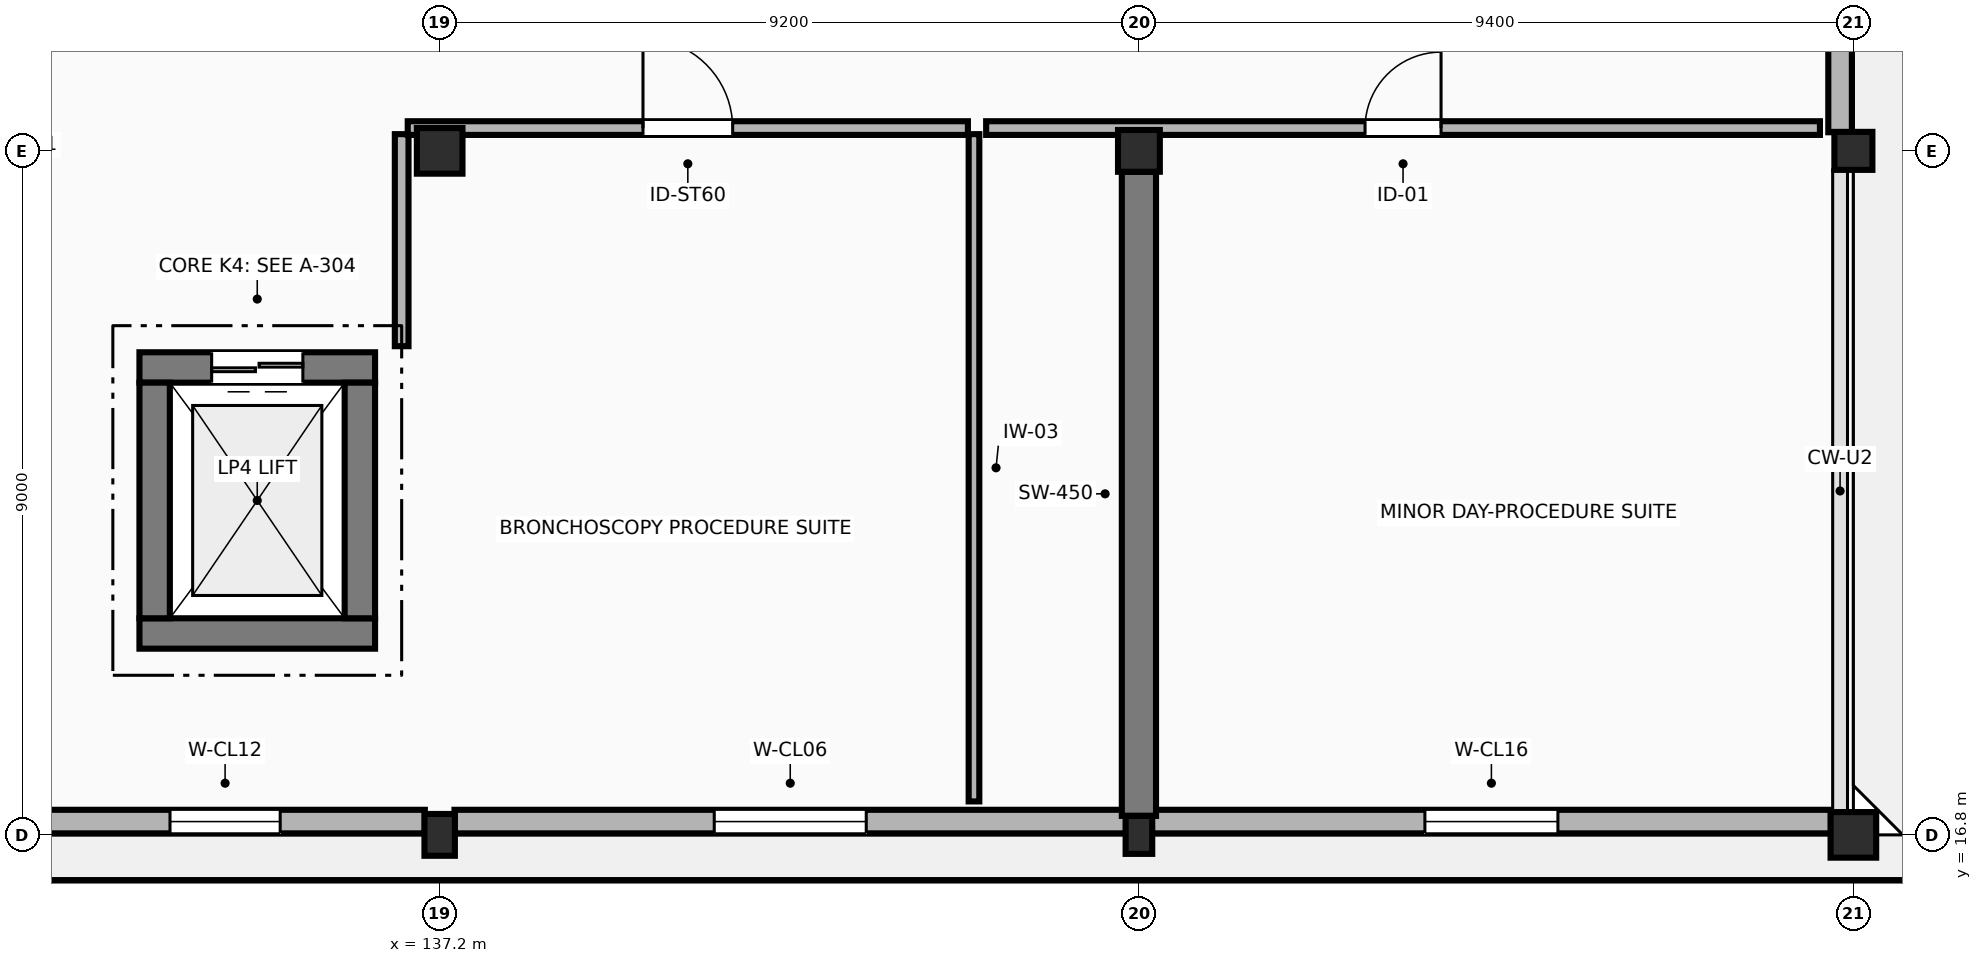
"""IFC4 building model, lengths in metres.
Left out: names, types, materials, properties, quantities, classifications, styles, units other than length and angle.
Written with IfcOpenShell. Run it as: python <this file> out.ifc"""

import sys

from ifc_helpers import new_model, si_unit, direction, frame, frame_2d, origin, origin_2d, place, context, subcontext, project, spatial, rectangle, extrude, element, fill, save


model = new_model("IFC4")
c1 = context("Model", 3, precision=1e-05, world=origin(), true_north=direction((0.0, 1.0)))
c2 = subcontext(c1, "Body", "Model", "MODEL_VIEW")
j1 = project(units=[si_unit("LENGTHUNIT", "METRE"), si_unit("PLANEANGLEUNIT", "RADIAN")], contexts=[c1])
p1 = place(None, origin())
s1 = spatial("IfcSite", under=j1, at=p1, CompositionType="ELEMENT")
p2 = place(p1, origin())
s2 = spatial("IfcBuilding", under=s1, at=p2, CompositionType="ELEMENT")
p3 = place(p2, frame((0.0, 0.0, 5.4)))
s3 = spatial("IfcBuildingStorey", under=s2, at=p3, CompositionType="ELEMENT", Elevation=5.4)
p4 = place(p3, frame((137.2, 16.8, 0.0), z_axis=(0.0, 0.0, 1.0), x_axis=(1.0, 0.0, 0.0)))
e1 = element("IfcColumn", 1, at=p4, inside=s3, PredefinedType="COLUMN", context=c2, shape_type="SweptSolid", body=[
    extrude(rectangle(XDim=0.4, YDim=0.55, at=origin_2d()), origin(), (0.0, 0.0, 1.0), 4.2),
])
p5 = place(p3, frame((137.2, 25.8, 0.0), z_axis=(0.0, 0.0, 1.0), x_axis=(1.0, 0.0, 0.0)))
e2 = element("IfcColumn", 2, at=p5, inside=s3, PredefinedType="COLUMN", context=c2, shape_type="SweptSolid", body=[
    extrude(rectangle(XDim=0.6, YDim=0.6, at=origin_2d()), origin(), (0.0, 0.0, 1.0), 4.2),
])
p6 = place(p3, frame((146.4, 16.8, 0.0), z_axis=(0.0, 0.0, 1.0), x_axis=(1.0, 0.0, 0.0)))
e3 = element("IfcColumn", 3, at=p6, inside=s3, PredefinedType="COLUMN", context=c2, shape_type="SweptSolid", body=[
    extrude(rectangle(XDim=0.35, YDim=0.5, at=origin_2d()), origin(), (0.0, 0.0, 1.0), 4.2),
])
p7 = place(p3, frame((146.4, 25.8, 0.0), z_axis=(0.0, 0.0, 1.0), x_axis=(1.0, 0.0, 0.0)))
e4 = element("IfcColumn", 4, at=p7, inside=s3, PredefinedType="COLUMN", context=c2, shape_type="SweptSolid", body=[
    extrude(rectangle(XDim=0.55, YDim=0.55, at=origin_2d()), origin(), (0.0, 0.0, 1.0), 4.2),
])
p8 = place(p3, frame((155.8, 16.8, 0.0), z_axis=(0.0, 0.0, 1.0), x_axis=(1.0, 0.0, 0.0)))
e5 = element("IfcColumn", 5, at=p8, inside=s3, PredefinedType="COLUMN", context=c2, shape_type="SweptSolid", body=[
    extrude(rectangle(XDim=0.6, YDim=0.6, at=origin_2d()), origin(), (0.0, 0.0, 1.0), 4.2),
])
p9 = place(p3, frame((155.8, 25.8, 0.0), z_axis=(0.0, 0.0, 1.0), x_axis=(1.0, 0.0, 0.0)))
e6 = element("IfcColumn", 6, at=p9, inside=s3, PredefinedType="COLUMN", context=c2, shape_type="SweptSolid", body=[
    extrude(rectangle(XDim=0.5, YDim=0.5, at=origin_2d()), origin(), (0.0, 0.0, 1.0), 4.2),
])
p10 = place(p3, frame((128.245, 16.975, 0.0), z_axis=(0.0, 0.0, 1.0), x_axis=(1.0, 0.0, 0.0)))
e7 = element("IfcWall", 7, at=p10, inside=s3, PredefinedType="STANDARD", context=c2, shape_type="SweptSolid", body=[
    extrude(rectangle(XDim=8.76, YDim=0.31, at=frame_2d((4.38, 0.0))), origin(), (0.0, 0.0, 1.0), 3.235),
])
p11 = place(p10, frame((1.903, 0.0, 0.95)))
e8 = element("IfcOpeningElement", 8, at=p11, cuts=e7, PredefinedType="OPENING", context=c2, shape_type="SweptSolid", body=[
    extrude(rectangle(XDim=1.45, YDim=1.7, at=frame_2d((0.725, 0.85))), frame((0.0, 0.165, 0.0), z_axis=(0.0, -1.0, 0.0), x_axis=(1.0, 0.0, 0.0)), (0.0, 0.0, 1.0), 0.33),
])
p12 = place(p10, frame((5.407, 0.0, 0.95)))
e9 = element("IfcOpeningElement", 9, at=p12, cuts=e7, PredefinedType="OPENING", context=c2, shape_type="SweptSolid", body=[
    extrude(rectangle(XDim=1.45, YDim=1.7, at=frame_2d((0.725, 0.85))), frame((0.0, 0.165, 0.0), z_axis=(0.0, -1.0, 0.0), x_axis=(1.0, 0.0, 0.0)), (0.0, 0.0, 1.0), 0.33),
])
p13 = place(p3, frame((137.395, 16.975, 0.0), z_axis=(0.0, 0.0, 1.0), x_axis=(1.0, 0.0, 0.0)))
e10 = element("IfcWall", 10, at=p13, inside=s3, PredefinedType="STANDARD", context=c2, shape_type="SweptSolid", body=[
    extrude(rectangle(XDim=8.835, YDim=0.31, at=frame_2d((4.417, 0.0))), origin(), (0.0, 0.0, 1.0), 3.235),
])
p14 = place(p13, frame((3.417, 0.0, 0.95)))
e11 = element("IfcOpeningElement", 11, at=p14, cuts=e10, PredefinedType="OPENING", context=c2, shape_type="SweptSolid", body=[
    extrude(rectangle(XDim=2.0, YDim=1.6, at=frame_2d((1.0, 0.8))), frame((0.0, 0.165, 0.0), z_axis=(0.0, -1.0, 0.0), x_axis=(1.0, 0.0, 0.0)), (0.0, 0.0, 1.0), 0.33),
])
p15 = place(p3, frame((146.57, 16.975, 0.0), z_axis=(0.0, 0.0, 1.0), x_axis=(1.0, 0.0, 0.0)))
e12 = element("IfcWall", 12, at=p15, inside=s3, PredefinedType="STANDARD", context=c2, shape_type="SweptSolid", body=[
    extrude(rectangle(XDim=8.935, YDim=0.31, at=frame_2d((4.467, 0.0))), origin(), (0.0, 0.0, 1.0), 3.235),
])
p16 = place(p15, frame((3.593, 0.0, 0.95)))
e13 = element("IfcOpeningElement", 13, at=p16, cuts=e12, PredefinedType="OPENING", context=c2, shape_type="SweptSolid", body=[
    extrude(rectangle(XDim=1.75, YDim=1.65, at=frame_2d((0.875, 0.825))), frame((0.0, 0.165, 0.0), z_axis=(0.0, -1.0, 0.0), x_axis=(1.0, 0.0, 0.0)), (0.0, 0.0, 1.0), 0.33),
])
p17 = place(p3, frame((155.625, 26.045, 0.0), z_axis=(0.0, 0.0, 1.0), x_axis=(0.0, 1.0, 0.0)))
e14 = element("IfcWall", 14, at=p17, inside=s3, PredefinedType="STANDARD", context=c2, shape_type="SweptSolid", body=[
    extrude(rectangle(XDim=8.31, YDim=0.31, at=frame_2d((4.155, 0.0))), origin(), (0.0, 0.0, 1.0), 3.345),
])
p18 = place(p3, frame((164.35, 16.1, 0.0), z_axis=(0.0, 0.0, 1.0), x_axis=(-1.0, 0.0, 0.0)))
e15 = element("IfcWall", 15, at=p18, inside=s3, PredefinedType="PARAPET", context=c2, shape_type="SweptSolid", body=[
    extrude(rectangle(XDim=44.85, YDim=0.21, at=frame_2d((22.425, 0.0))), origin(), (0.0, 0.0, 1.0), 1.05),
])
p19 = place(p3, frame((133.25, 19.45, 0.0), z_axis=(0.0, 0.0, 1.0), x_axis=(1.0, 0.0, 0.0)))
e16 = element("IfcWall", 16, at=p19, inside=s3, PredefinedType="SHEAR", context=c2, shape_type="SweptSolid", body=[
    extrude(rectangle(XDim=3.1, YDim=0.4, at=frame_2d((1.55, 0.0))), origin(), (0.0, 0.0, 1.0), 4.2),
])
p20 = place(p3, frame((136.35, 22.95, 0.0), z_axis=(0.0, 0.0, 1.0), x_axis=(-1.0, 0.0, 0.0)))
e17 = element("IfcWall", 17, at=p20, inside=s3, PredefinedType="SHEAR", context=c2, shape_type="SweptSolid", body=[
    extrude(rectangle(XDim=3.1, YDim=0.4, at=frame_2d((1.55, 0.0))), origin(), (0.0, 0.0, 1.0), 4.2),
])
p21 = place(p20, frame((0.95, 0.0, 0.0)))
e18 = element("IfcOpeningElement", 18, at=p21, cuts=e17, PredefinedType="OPENING", context=c2, shape_type="SweptSolid", body=[
    extrude(rectangle(XDim=1.2, YDim=2.2, at=frame_2d((0.6, 1.1))), frame((0.0, 0.21, 0.0), z_axis=(0.0, -1.0, 0.0), x_axis=(1.0, 0.0, 0.0)), (0.0, 0.0, 1.0), 0.42),
])
for number, where, z_axis, x_axis in (
    (19, (133.45, 19.65, 0.0), (0.0, 0.0, 1.0), (0.0, 1.0, 0.0)),
    (20, (136.15, 22.75, 0.0), (0.0, 0.0, 1.0), (0.0, -1.0, 0.0)),
):
    element("IfcWall", number, at=place(p3, frame(where, z_axis=z_axis, x_axis=x_axis)), inside=s3, PredefinedType="SHEAR", context=c2, shape_type="SweptSolid", body=[
        extrude(rectangle(XDim=3.1, YDim=0.4, at=frame_2d((1.55, 0.0))), origin(), (0.0, 0.0, 1.0), 4.2),
    ])
p22 = place(p3, frame((146.4, 17.05, 0.0), z_axis=(0.0, 0.0, 1.0), x_axis=(0.0, 1.0, 0.0)))
e21 = element("IfcWall", 21, at=p22, inside=s3, PredefinedType="SHEAR", context=c2, shape_type="SweptSolid", body=[
    extrude(rectangle(XDim=8.475, YDim=0.45, at=frame_2d((4.237, 0.0))), origin(), (0.0, 0.0, 1.0), 3.9),
])
p23 = place(p3, frame((136.7, 23.23, 0.0), z_axis=(0.0, 0.0, 1.0), x_axis=(0.0, 1.0, 0.0)))
e22 = element("IfcWall", 22, at=p23, inside=s3, PredefinedType="PARTITIONING", context=c2, shape_type="SweptSolid", body=[
    extrude(rectangle(XDim=2.79, YDim=0.18, at=frame_2d((1.395, 0.0))), origin(), (0.0, 0.0, 1.0), 3.385),
])
p24 = place(p3, frame((136.78, 26.1, 0.0), z_axis=(0.0, 0.0, 1.0), x_axis=(1.0, 0.0, 0.0)))
e23 = element("IfcWall", 23, at=p24, inside=s3, PredefinedType="PARTITIONING", context=c2, shape_type="SweptSolid", body=[
    extrude(rectangle(XDim=7.37, YDim=0.18, at=frame_2d((3.685, 0.0))), origin(), (0.0, 0.0, 1.0), 3.235),
])
p25 = place(p24, frame((3.095, 0.0, 0.0)))
e24 = element("IfcOpeningElement", 24, at=p25, cuts=e23, PredefinedType="OPENING", context=c2, shape_type="SweptSolid", body=[
    extrude(rectangle(XDim=1.18, YDim=2.18, at=frame_2d((0.59, 1.09))), frame((0.0, 0.1, 0.0), z_axis=(0.0, -1.0, 0.0), x_axis=(1.0, 0.0, 0.0)), (0.0, 0.0, 1.0), 0.2),
])
p26 = place(p3, frame((144.23, 26.02, 0.0), z_axis=(0.0, 0.0, 1.0), x_axis=(0.0, -1.0, 0.0)))
e25 = element("IfcWall", 25, at=p26, inside=s3, PredefinedType="PARTITIONING", context=c2, shape_type="SweptSolid", body=[
    extrude(rectangle(XDim=8.78, YDim=0.14, at=frame_2d((4.39, 0.0))), origin(), (0.0, 0.0, 1.0), 3.9),
])
p27 = place(p3, frame((144.39, 26.1, 0.0), z_axis=(0.0, 0.0, 1.0), x_axis=(1.0, 0.0, 0.0)))
e26 = element("IfcWall", 26, at=p27, inside=s3, PredefinedType="PARTITIONING", context=c2, shape_type="SweptSolid", body=[
    extrude(rectangle(XDim=10.97, YDim=0.18, at=frame_2d((5.485, 0.0))), origin(), (0.0, 0.0, 1.0), 3.235),
])
p28 = place(p27, frame((4.985, 0.0, 0.0)))
e27 = element("IfcOpeningElement", 27, at=p28, cuts=e26, PredefinedType="OPENING", context=c2, shape_type="SweptSolid", body=[
    extrude(rectangle(XDim=1.0, YDim=2.15, at=frame_2d((0.5, 1.075))), frame((0.0, 0.1, 0.0), z_axis=(0.0, -1.0, 0.0), x_axis=(1.0, 0.0, 0.0)), (0.0, 0.0, 1.0), 0.2),
])
p29 = place(p12, origin())
e28 = element("IfcWindow", 28, at=p29, inside=s3, PartitioningType="SINGLE_PANEL", PredefinedType="WINDOW", context=c2, shape_type="SweptSolid", body=[
    extrude(rectangle(XDim=1.45, YDim=1.7, at=frame_2d((0.725, 0.85))), frame((0.0, 0.03, 0.0), z_axis=(0.0, -1.0, 0.0), x_axis=(1.0, 0.0, 0.0)), (0.0, 0.0, 1.0), 0.06),
])
fill(e9, e28)
p30 = place(p14, origin())
e29 = element("IfcWindow", 29, at=p30, inside=s3, PartitioningType="SINGLE_PANEL", PredefinedType="WINDOW", context=c2, shape_type="SweptSolid", body=[
    extrude(rectangle(XDim=2.0, YDim=1.6, at=frame_2d((1.0, 0.8))), frame((0.0, 0.03, 0.0), z_axis=(0.0, -1.0, 0.0), x_axis=(1.0, 0.0, 0.0)), (0.0, 0.0, 1.0), 0.06),
])
fill(e11, e29)
p31 = place(p16, origin())
e30 = element("IfcWindow", 30, at=p31, inside=s3, PartitioningType="SINGLE_PANEL", PredefinedType="WINDOW", context=c2, shape_type="SweptSolid", body=[
    extrude(rectangle(XDim=1.75, YDim=1.65, at=frame_2d((0.875, 0.825))), frame((0.0, 0.03, 0.0), z_axis=(0.0, -1.0, 0.0), x_axis=(1.0, 0.0, 0.0)), (0.0, 0.0, 1.0), 0.06),
])
fill(e13, e30)
p32 = place(p21, origin())
e31 = element("IfcDoor", 31, at=p32, inside=s3, OperationType="DOUBLE_DOOR_SLIDING", PredefinedType="DOOR", context=c2, shape_type="SweptSolid", body=[
    extrude(rectangle(XDim=1.2, YDim=2.2, at=frame_2d((0.6, 1.1))), frame((0.0, 0.025, 0.0), z_axis=(0.0, -1.0, 0.0), x_axis=(1.0, 0.0, 0.0)), (0.0, 0.0, 1.0), 0.05),
])
fill(e18, e31)
p33 = place(p25, origin())
e32 = element("IfcDoor", 32, at=p33, inside=s3, OperationType="SINGLE_SWING_LEFT", PredefinedType="DOOR", context=c2, shape_type="SweptSolid", body=[
    extrude(rectangle(XDim=1.18, YDim=2.18, at=frame_2d((0.59, 1.09))), frame((0.0, 0.025, 0.0), z_axis=(0.0, -1.0, 0.0), x_axis=(1.0, 0.0, 0.0)), (0.0, 0.0, 1.0), 0.05),
])
fill(e24, e32)
p34 = place(p28, origin())
e33 = element("IfcDoor", 33, at=p34, inside=s3, OperationType="SINGLE_SWING_RIGHT", PredefinedType="DOOR", context=c2, shape_type="SweptSolid", body=[
    extrude(rectangle(XDim=1.0, YDim=2.15, at=frame_2d((0.5, 1.075))), frame((0.0, 0.025, 0.0), z_axis=(0.0, -1.0, 0.0), x_axis=(1.0, 0.0, 0.0)), (0.0, 0.0, 1.0), 0.05),
])
fill(e27, e33)
save(model, sys.argv[1])
